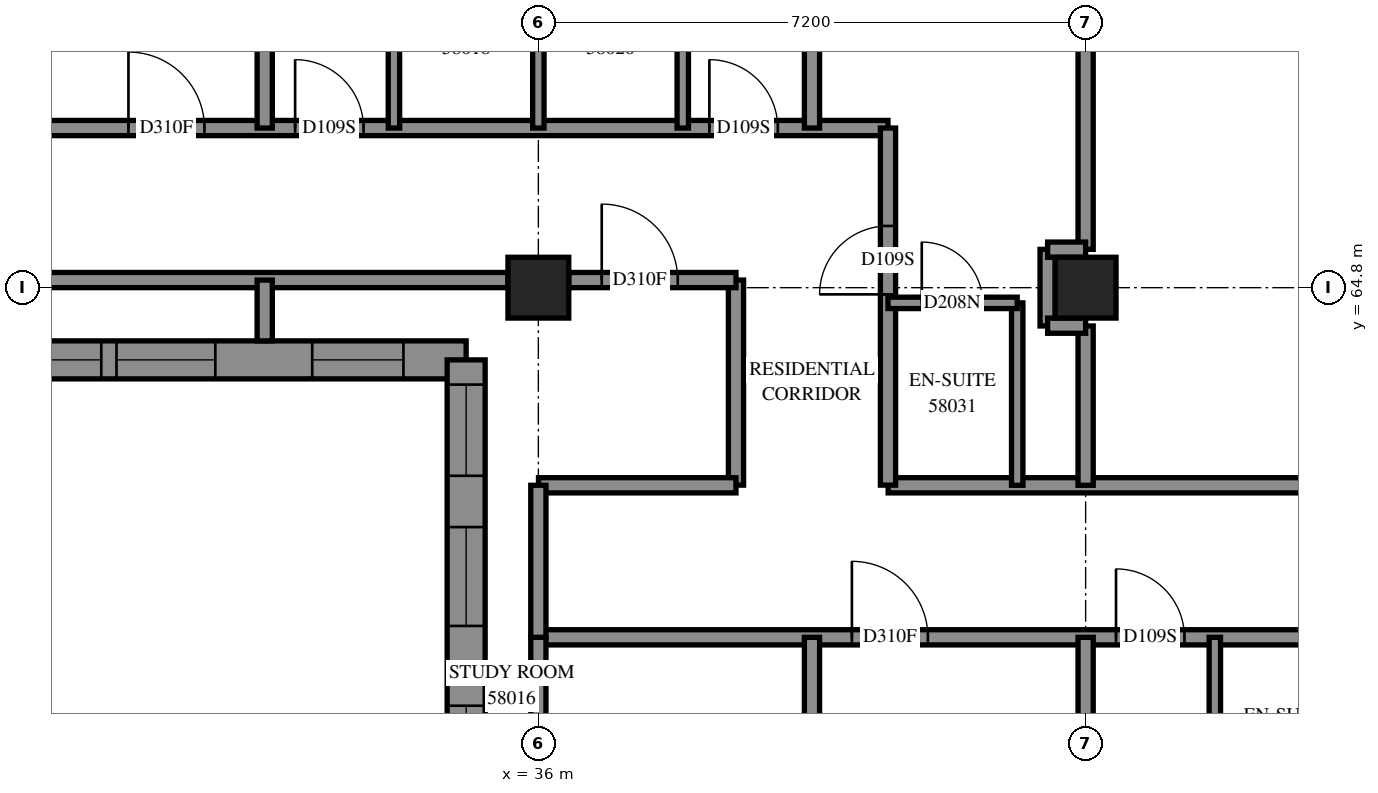
"""IFC4 building model, lengths in metres.
Left out: names, types, materials, properties, quantities, classifications, styles, units other than length and angle.
Written with IfcOpenShell. Run it as: python <this file> out.ifc"""

import sys

from ifc_helpers import new_model, si_unit, direction, frame, frame_2d, origin, origin_2d, place, context, subcontext, project, spatial, polyline, rectangle, outline, extrude, element, fill, save


model = new_model("IFC4")
c1 = context("Model", 3, precision=1e-05, world=origin(), true_north=direction((0.0, 1.0)))
c2 = subcontext(c1, "Body", "Model", "MODEL_VIEW")
j1 = project(units=[si_unit("LENGTHUNIT", "METRE"), si_unit("PLANEANGLEUNIT", "RADIAN")], contexts=[c1])
p1 = place(None, origin())
s1 = spatial("IfcSite", under=j1, at=p1, CompositionType="ELEMENT")
p2 = place(p1, origin())
s2 = spatial("IfcBuilding", under=s1, at=p2, CompositionType="ELEMENT")
p3 = place(p2, frame((0.0, 0.0, 213.4)))
s3 = spatial("IfcBuildingStorey", under=s2, at=p3, CompositionType="ELEMENT", Elevation=213.4)
for number, where, z_axis, x_axis in (
    (1, (36.0, 64.8, 0.0), (0.0, 0.0, 1.0), (1.0, 0.0, 0.0)),
    (2, (43.2, 64.8, 0.0), (0.0, 0.0, 1.0), (1.0, 0.0, 0.0)),
):
    element("IfcColumn", number, at=place(p3, frame(where, z_axis=z_axis, x_axis=x_axis)), inside=s3, PredefinedType="COLUMN", context=c2, shape_type="SweptSolid", body=[
        extrude(rectangle(XDim=0.8, YDim=0.8, at=origin_2d()), origin(), (0.0, 0.0, 1.0), 3.1),
    ])
p4 = place(p3, frame((26.738, 63.85, 0.0), z_axis=(0.0, 0.0, 1.0), x_axis=(1.0, 0.0, 0.0)))
e3 = element("IfcWall", 3, at=p4, inside=s3, PredefinedType="SOLIDWALL", context=c2, shape_type="SweptSolid", body=[
    extrude(outline(polyline([(-0.25, -0.25), (8.062, -0.25), (8.562, 0.25), (0.25, 0.25), (-0.25, -0.25)])), origin(), (0.0, 0.0, 1.0), 3.1),
])
p5 = place(p4, frame((2.212, 0.0, 0.45)))
e4 = element("IfcOpeningElement", 4, at=p5, cuts=e3, PredefinedType="OPENING", context=c2, shape_type="SweptSolid", body=[
    extrude(rectangle(XDim=1.3, YDim=2.5, at=frame_2d((0.65, 1.25))), frame((0.0, 0.26, 0.0), z_axis=(0.0, -1.0, 0.0), x_axis=(1.0, 0.0, 0.0)), (0.0, 0.0, 1.0), 0.52),
])
p6 = place(p4, frame((3.712, 0.0, 0.45)))
e5 = element("IfcOpeningElement", 5, at=p6, cuts=e3, PredefinedType="OPENING", context=c2, shape_type="SweptSolid", body=[
    extrude(rectangle(XDim=1.3, YDim=2.5, at=frame_2d((0.65, 1.25))), frame((0.0, 0.26, 0.0), z_axis=(0.0, -1.0, 0.0), x_axis=(1.0, 0.0, 0.0)), (0.0, 0.0, 1.0), 0.52),
])
p7 = place(p4, frame((0.656, 0.0, 0.45)))
e6 = element("IfcOpeningElement", 6, at=p7, cuts=e3, PredefinedType="OPENING", context=c2, shape_type="SweptSolid", body=[
    extrude(rectangle(XDim=1.2, YDim=2.5, at=frame_2d((0.6, 1.25))), frame((0.0, 0.26, 0.0), z_axis=(0.0, -1.0, 0.0), x_axis=(1.0, 0.0, 0.0)), (0.0, 0.0, 1.0), 0.52),
])
p8 = place(p4, frame((6.287, 0.0, 0.45)))
e7 = element("IfcOpeningElement", 7, at=p8, cuts=e3, PredefinedType="OPENING", context=c2, shape_type="SweptSolid", body=[
    extrude(rectangle(XDim=1.2, YDim=2.5, at=frame_2d((0.6, 1.25))), frame((0.0, 0.26, 0.0), z_axis=(0.0, -1.0, 0.0), x_axis=(1.0, 0.0, 0.0)), (0.0, 0.0, 1.0), 0.52),
])
p9 = place(p3, frame((35.05, 63.85, 0.0), z_axis=(0.0, 0.0, 1.0), x_axis=(0.0, -1.0, 0.0)))
e8 = element("IfcWall", 8, at=p9, inside=s3, PredefinedType="SOLIDWALL", context=c2, shape_type="SweptSolid", body=[
    extrude(outline(polyline([(0.25, -0.25), (7.45, -0.25), (6.95, 0.25), (-0.25, 0.25), (0.25, -0.25)])), origin(), (0.0, 0.0, 1.0), 3.1),
])
p10 = place(p9, frame((2.2, 0.0, 0.45)))
e9 = element("IfcOpeningElement", 9, at=p10, cuts=e8, PredefinedType="OPENING", context=c2, shape_type="SweptSolid", body=[
    extrude(rectangle(XDim=1.3, YDim=2.5, at=frame_2d((0.65, 1.25))), frame((0.0, 0.26, 0.0), z_axis=(0.0, -1.0, 0.0), x_axis=(1.0, 0.0, 0.0)), (0.0, 0.0, 1.0), 0.52),
])
p11 = place(p9, frame((4.55, 0.0, 0.45)))
e10 = element("IfcOpeningElement", 10, at=p11, cuts=e8, PredefinedType="OPENING", context=c2, shape_type="SweptSolid", body=[
    extrude(rectangle(XDim=1.3, YDim=2.5, at=frame_2d((0.65, 1.25))), frame((0.0, 0.26, 0.0), z_axis=(0.0, -1.0, 0.0), x_axis=(1.0, 0.0, 0.0)), (0.0, 0.0, 1.0), 0.52),
])
p12 = place(p9, frame((0.325, 0.0, 0.45)))
e11 = element("IfcOpeningElement", 11, at=p12, cuts=e8, PredefinedType="OPENING", context=c2, shape_type="SweptSolid", body=[
    extrude(rectangle(XDim=1.2, YDim=2.5, at=frame_2d((0.6, 1.25))), frame((0.0, 0.26, 0.0), z_axis=(0.0, -1.0, 0.0), x_axis=(1.0, 0.0, 0.0)), (0.0, 0.0, 1.0), 0.52),
])
p13 = place(p3, frame((36.0, 60.2, 0.0), z_axis=(0.0, 0.0, 1.0), x_axis=(1.0, 0.0, 0.0)))
e12 = element("IfcWall", 12, at=p13, inside=s3, PredefinedType="PARTITIONING", context=c2, shape_type="SweptSolid", body=[
    extrude(rectangle(XDim=17.0, YDim=0.2, at=frame_2d((8.5, 0.0))), origin(), (0.0, 0.0, 1.0), 3.1),
])
p14 = place(p13, frame((4.125, 0.0, 0.0)))
e13 = element("IfcOpeningElement", 13, at=p14, cuts=e12, PredefinedType="OPENING", context=c2, shape_type="SweptSolid", body=[
    extrude(rectangle(XDim=1.0, YDim=2.1, at=frame_2d((0.5, 1.05))), frame((0.0, 0.11, 0.0), z_axis=(0.0, -1.0, 0.0), x_axis=(1.0, 0.0, 0.0)), (0.0, 0.0, 1.0), 0.22),
])
p15 = place(p13, frame((7.6, 0.0, 0.0)))
e14 = element("IfcOpeningElement", 14, at=p15, cuts=e12, PredefinedType="OPENING", context=c2, shape_type="SweptSolid", body=[
    extrude(rectangle(XDim=0.9, YDim=2.1, at=frame_2d((0.45, 1.05))), frame((0.0, 0.11, 0.0), z_axis=(0.0, -1.0, 0.0), x_axis=(1.0, 0.0, 0.0)), (0.0, 0.0, 1.0), 0.22),
])
p16 = place(p13, frame((11.48, 0.0, 0.0)))
e15 = element("IfcOpeningElement", 15, at=p16, cuts=e12, PredefinedType="OPENING", context=c2, shape_type="SweptSolid", body=[
    extrude(rectangle(XDim=1.0, YDim=2.1, at=frame_2d((0.5, 1.05))), frame((0.0, 0.11, 0.0), z_axis=(0.0, -1.0, 0.0), x_axis=(1.0, 0.0, 0.0)), (0.0, 0.0, 1.0), 0.22),
])
p17 = place(p13, frame((15.805, 0.0, 0.0)))
e16 = element("IfcOpeningElement", 16, at=p17, cuts=e12, PredefinedType="OPENING", context=c2, shape_type="SweptSolid", body=[
    extrude(rectangle(XDim=1.0, YDim=2.1, at=frame_2d((0.5, 1.05))), frame((0.0, 0.11, 0.0), z_axis=(0.0, -1.0, 0.0), x_axis=(1.0, 0.0, 0.0)), (0.0, 0.0, 1.0), 0.22),
])
p18 = place(p3, frame((40.602, 62.2, 0.0), z_axis=(0.0, 0.0, 1.0), x_axis=(1.0, 0.0, 0.0)))
e17 = element("IfcWall", 17, at=p18, inside=s3, PredefinedType="PARTITIONING", context=c2, shape_type="SweptSolid", body=[
    extrude(rectangle(XDim=14.998, YDim=0.2, at=frame_2d((7.499, 0.0))), origin(), (0.0, 0.0, 1.0), 3.1),
])
p19 = place(p18, frame((6.308, 0.0, 0.0)))
e18 = element("IfcOpeningElement", 18, at=p19, cuts=e17, PredefinedType="OPENING", context=c2, shape_type="SweptSolid", body=[
    extrude(rectangle(XDim=1.0, YDim=2.1, at=frame_2d((0.5, 1.05))), frame((0.0, 0.11, 0.0), z_axis=(0.0, -1.0, 0.0), x_axis=(1.0, 0.0, 0.0)), (0.0, 0.0, 1.0), 0.22),
])
p20 = place(p18, frame((9.928, 0.0, 0.0)))
e19 = element("IfcOpeningElement", 19, at=p20, cuts=e17, PredefinedType="OPENING", context=c2, shape_type="SweptSolid", body=[
    extrude(rectangle(XDim=0.9, YDim=2.1, at=frame_2d((0.45, 1.05))), frame((0.0, 0.11, 0.0), z_axis=(0.0, -1.0, 0.0), x_axis=(1.0, 0.0, 0.0)), (0.0, 0.0, 1.0), 0.22),
])
p21 = place(p18, frame((13.746, 0.0, 0.0)))
e20 = element("IfcOpeningElement", 20, at=p21, cuts=e17, PredefinedType="OPENING", context=c2, shape_type="SweptSolid", body=[
    extrude(rectangle(XDim=1.0, YDim=2.1, at=frame_2d((0.5, 1.05))), frame((0.0, 0.11, 0.0), z_axis=(0.0, -1.0, 0.0), x_axis=(1.0, 0.0, 0.0)), (0.0, 0.0, 1.0), 0.22),
])
p22 = place(p3, frame((28.802, 66.9, 0.0), z_axis=(0.0, 0.0, 1.0), x_axis=(1.0, 0.0, 0.0)))
e21 = element("IfcWall", 21, at=p22, inside=s3, PredefinedType="PARTITIONING", context=c2, shape_type="SweptSolid", body=[
    extrude(rectangle(XDim=11.798, YDim=0.2, at=frame_2d((5.899, 0.0))), origin(), (0.0, 0.0, 1.0), 3.1),
])
p23 = place(p22, frame((1.805, 0.0, 0.0)))
e22 = element("IfcOpeningElement", 22, at=p23, cuts=e21, PredefinedType="OPENING", context=c2, shape_type="SweptSolid", body=[
    extrude(rectangle(XDim=1.0, YDim=2.1, at=frame_2d((0.5, 1.05))), frame((0.0, 0.11, 0.0), z_axis=(0.0, -1.0, 0.0), x_axis=(1.0, 0.0, 0.0)), (0.0, 0.0, 1.0), 0.22),
])
p24 = place(p22, frame((3.998, 0.0, 0.0)))
e23 = element("IfcOpeningElement", 23, at=p24, cuts=e21, PredefinedType="OPENING", context=c2, shape_type="SweptSolid", body=[
    extrude(rectangle(XDim=0.9, YDim=2.1, at=frame_2d((0.45, 1.05))), frame((0.0, 0.11, 0.0), z_axis=(0.0, -1.0, 0.0), x_axis=(1.0, 0.0, 0.0)), (0.0, 0.0, 1.0), 0.22),
])
p25 = place(p22, frame((9.448, 0.0, 0.0)))
e24 = element("IfcOpeningElement", 24, at=p25, cuts=e21, PredefinedType="OPENING", context=c2, shape_type="SweptSolid", body=[
    extrude(rectangle(XDim=0.9, YDim=2.1, at=frame_2d((0.45, 1.05))), frame((0.0, 0.11, 0.0), z_axis=(0.0, -1.0, 0.0), x_axis=(1.0, 0.0, 0.0)), (0.0, 0.0, 1.0), 0.22),
])
p26 = place(p3, frame((29.2, 64.9, 0.0), z_axis=(0.0, 0.0, 1.0), x_axis=(1.0, 0.0, 0.0)))
e25 = element("IfcWall", 25, at=p26, inside=s3, PredefinedType="PARTITIONING", context=c2, shape_type="SweptSolid", body=[
    extrude(rectangle(XDim=6.4, YDim=0.2, at=frame_2d((3.2, 0.0))), origin(), (0.0, 0.0, 1.0), 2.6),
])
p27 = place(p3, frame((43.2, 65.304, 0.0), z_axis=(0.0, 0.0, 1.0), x_axis=(0.0, 1.0, 0.0)))
e26 = element("IfcWall", 26, at=p27, inside=s3, PredefinedType="PARTITIONING", context=c2, shape_type="SweptSolid", body=[
    extrude(rectangle(XDim=6.192, YDim=0.2, at=frame_2d((3.096, 0.0))), origin(), (0.0, 0.0, 1.0), 3.1),
])
p28 = place(p3, frame((32.4, 66.9, 0.0), z_axis=(0.0, 0.0, 1.0), x_axis=(0.0, 1.0, 0.0)))
e27 = element("IfcWall", 27, at=p28, inside=s3, PredefinedType="PARTITIONING", context=c2, shape_type="SweptSolid", body=[
    extrude(rectangle(XDim=6.073, YDim=0.2, at=frame_2d((3.037, 0.0))), origin(), (0.0, 0.0, 1.0), 3.1),
])
p29 = place(p3, frame((39.6, 66.9, 0.0), z_axis=(0.0, 0.0, 1.0), x_axis=(0.0, 1.0, 0.0)))
e28 = element("IfcWall", 28, at=p29, inside=s3, PredefinedType="PARTITIONING", context=c2, shape_type="SweptSolid", body=[
    extrude(rectangle(XDim=6.011, YDim=0.2, at=frame_2d((3.005, 0.0))), origin(), (0.0, 0.0, 1.0), 3.1),
])
p30 = place(p3, frame((40.6, 62.202, 0.0), z_axis=(0.0, 0.0, 1.0), x_axis=(0.0, 1.0, 0.0)))
e29 = element("IfcWall", 29, at=p30, inside=s3, PredefinedType="PARTITIONING", context=c2, shape_type="SweptSolid", body=[
    extrude(rectangle(XDim=4.698, YDim=0.2, at=frame_2d((2.349, 0.0))), origin(), (0.0, 0.0, 1.0), 3.1),
])
p31 = place(p30, frame((2.51, 0.0, 0.0)))
e30 = element("IfcOpeningElement", 30, at=p31, cuts=e29, PredefinedType="OPENING", context=c2, shape_type="SweptSolid", body=[
    extrude(rectangle(XDim=0.9, YDim=2.1, at=frame_2d((0.45, 1.05))), frame((0.0, 0.11, 0.0), z_axis=(0.0, -1.0, 0.0), x_axis=(1.0, 0.0, 0.0)), (0.0, 0.0, 1.0), 0.22),
])
p32 = place(p3, frame((39.6, 56.9, 0.0), z_axis=(0.0, 0.0, 1.0), x_axis=(0.0, 1.0, 0.0)))
e31 = element("IfcWall", 31, at=p32, inside=s3, PredefinedType="PARTITIONING", context=c2, shape_type="SweptSolid", body=[
    extrude(rectangle(XDim=3.3, YDim=0.2, at=frame_2d((1.65, 0.0))), origin(), (0.0, 0.0, 1.0), 3.1),
])
p33 = place(p3, frame((38.6, 62.202, 0.0), z_axis=(0.0, 0.0, 1.0), x_axis=(0.0, 1.0, 0.0)))
e32 = element("IfcWall", 32, at=p33, inside=s3, PredefinedType="PARTITIONING", context=c2, shape_type="SweptSolid", body=[
    extrude(rectangle(XDim=2.698, YDim=0.2, at=frame_2d((1.349, 0.0))), origin(), (0.0, 0.0, 1.0), 3.1),
])
p34 = place(p3, frame((36.002, 62.2, 0.0), z_axis=(0.0, 0.0, 1.0), x_axis=(1.0, 0.0, 0.0)))
e33 = element("IfcWall", 33, at=p34, inside=s3, PredefinedType="PARTITIONING", context=c2, shape_type="SweptSolid", body=[
    extrude(rectangle(XDim=2.598, YDim=0.2, at=frame_2d((1.299, 0.0))), origin(), (0.0, 0.0, 1.0), 3.1),
])
for number, where, z_axis, x_axis in (
    (34, (44.9, 57.8, 0.0), (0.0, 0.0, 1.0), (0.0, 1.0, 0.0)),
    (35, (34.1, 66.9, 0.0), (0.0, 0.0, 1.0), (0.0, 1.0, 0.0)),
    (36, (36.0, 66.9, 0.0), (0.0, 0.0, 1.0), (0.0, 1.0, 0.0)),
    (37, (37.9, 66.9, 0.0), (0.0, 0.0, 1.0), (0.0, 1.0, 0.0)),
    (38, (42.3, 62.2, 0.0), (0.0, 0.0, 1.0), (0.0, 1.0, 0.0)),
):
    element("IfcWall", number, at=place(p3, frame(where, z_axis=z_axis, x_axis=x_axis)), inside=s3, PredefinedType="PARTITIONING", context=c2, shape_type="SweptSolid", body=[
        extrude(rectangle(XDim=2.4, YDim=0.15, at=frame_2d((1.2, 0.0))), origin(), (0.0, 0.0, 1.0), 3.1),
    ])
p35 = place(p3, frame((36.4, 64.9, 0.0), z_axis=(0.0, 0.0, 1.0), x_axis=(1.0, 0.0, 0.0)))
e39 = element("IfcWall", 39, at=p35, inside=s3, PredefinedType="PARTITIONING", context=c2, shape_type="SweptSolid", body=[
    extrude(rectangle(XDim=2.2, YDim=0.2, at=frame_2d((1.1, 0.0))), origin(), (0.0, 0.0, 1.0), 3.1),
])
p36 = place(p35, frame((0.434, 0.0, 0.0)))
e40 = element("IfcOpeningElement", 40, at=p36, cuts=e39, PredefinedType="OPENING", context=c2, shape_type="SweptSolid", body=[
    extrude(rectangle(XDim=1.0, YDim=2.1, at=frame_2d((0.5, 1.05))), frame((0.0, 0.11, 0.0), z_axis=(0.0, -1.0, 0.0), x_axis=(1.0, 0.0, 0.0)), (0.0, 0.0, 1.0), 0.22),
])
p37 = place(p3, frame((36.0, 58.0, 0.0), z_axis=(0.0, 0.0, 1.0), x_axis=(0.0, 1.0, 0.0)))
e41 = element("IfcWall", 41, at=p37, inside=s3, PredefinedType="PARTITIONING", context=c2, shape_type="SweptSolid", body=[
    extrude(rectangle(XDim=2.2, YDim=0.2, at=frame_2d((1.1, 0.0))), origin(), (0.0, 0.0, 1.0), 2.6),
])
p38 = place(p3, frame((43.2, 58.0, 0.0), z_axis=(0.0, 0.0, 1.0), x_axis=(0.0, 1.0, 0.0)))
e42 = element("IfcWall", 42, at=p38, inside=s3, PredefinedType="PARTITIONING", context=c2, shape_type="SweptSolid", body=[
    extrude(rectangle(XDim=2.2, YDim=0.2, at=frame_2d((1.1, 0.0))), origin(), (0.0, 0.0, 1.0), 3.1),
])
p39 = place(p3, frame((43.2, 62.2, 0.0), z_axis=(0.0, 0.0, 1.0), x_axis=(0.0, 1.0, 0.0)))
e43 = element("IfcWall", 43, at=p39, inside=s3, PredefinedType="PARTITIONING", context=c2, shape_type="SweptSolid", body=[
    extrude(rectangle(XDim=2.096, YDim=0.2, at=frame_2d((1.048, 0.0))), origin(), (0.0, 0.0, 1.0), 3.1),
])
p40 = place(p3, frame((36.0, 60.2, 0.0), z_axis=(0.0, 0.0, 1.0), x_axis=(0.0, 1.0, 0.0)))
e44 = element("IfcWall", 44, at=p40, inside=s3, PredefinedType="PARTITIONING", context=c2, shape_type="SweptSolid", body=[
    extrude(rectangle(XDim=2.0, YDim=0.2, at=frame_2d((1.0, 0.0))), origin(), (0.0, 0.0, 1.0), 2.6),
])
p41 = place(p3, frame((40.6, 64.6, 0.0), z_axis=(0.0, 0.0, 1.0), x_axis=(1.0, 0.0, 0.0)))
e45 = element("IfcWall", 45, at=p41, inside=s3, PredefinedType="PARTITIONING", context=c2, shape_type="SweptSolid", body=[
    extrude(rectangle(XDim=1.7, YDim=0.15, at=frame_2d((0.85, 0.0))), origin(), (0.0, 0.0, 1.0), 3.1),
])
p42 = place(p41, frame((0.444, 0.0, 0.0)))
e46 = element("IfcOpeningElement", 46, at=p42, cuts=e45, PredefinedType="OPENING", context=c2, shape_type="SweptSolid", body=[
    extrude(rectangle(XDim=0.8, YDim=2.1, at=frame_2d((0.4, 1.05))), frame((0.0, 0.085, 0.0), z_axis=(0.0, -1.0, 0.0), x_axis=(1.0, 0.0, 0.0)), (0.0, 0.0, 1.0), 0.17),
])
p43 = place(p3, frame((42.7, 64.296, 0.0), z_axis=(0.0, 0.0, 1.0), x_axis=(0.0, 1.0, 0.0)))
e47 = element("IfcWall", 47, at=p43, inside=s3, PredefinedType="PARTITIONING", context=c2, shape_type="SweptSolid", body=[
    extrude(rectangle(XDim=1.008, YDim=0.2, at=frame_2d((0.504, 0.0))), origin(), (0.0, 0.0, 1.0), 3.1),
])
p44 = place(p3, frame((32.4, 64.1, 0.0), z_axis=(0.0, 0.0, 1.0), x_axis=(0.0, 1.0, 0.0)))
e48 = element("IfcWall", 48, at=p44, inside=s3, PredefinedType="PARTITIONING", context=c2, shape_type="SweptSolid", body=[
    extrude(rectangle(XDim=0.8, YDim=0.2, at=frame_2d((0.4, 0.0))), origin(), (0.0, 0.0, 1.0), 3.1),
])
for number, where, z_axis, x_axis in (
    (49, (42.7, 65.3, 0.0), (0.0, 0.0, 1.0), (1.0, 0.0, 0.0)),
    (50, (42.7, 64.3, 0.0), (0.0, 0.0, 1.0), (1.0, 0.0, 0.0)),
):
    element("IfcWall", number, at=place(p3, frame(where, z_axis=z_axis, x_axis=x_axis)), inside=s3, PredefinedType="PARTITIONING", context=c2, shape_type="SweptSolid", body=[
        extrude(rectangle(XDim=0.5, YDim=0.2, at=frame_2d((0.25, 0.0))), origin(), (0.0, 0.0, 1.0), 3.1),
    ])
p45 = place(p5, origin())
e51 = element("IfcWindow", 51, at=p45, inside=s3, PartitioningType="SINGLE_PANEL", PredefinedType="WINDOW", context=c2, shape_type="SweptSolid", body=[
    extrude(rectangle(XDim=1.3, YDim=2.5, at=frame_2d((0.65, 1.25))), frame((0.0, 0.18, 0.0), z_axis=(0.0, -1.0, 0.0), x_axis=(1.0, 0.0, 0.0)), (0.0, 0.0, 1.0), 0.06),
])
fill(e4, e51)
p46 = place(p6, origin())
e52 = element("IfcWindow", 52, at=p46, inside=s3, PartitioningType="SINGLE_PANEL", PredefinedType="WINDOW", context=c2, shape_type="SweptSolid", body=[
    extrude(rectangle(XDim=1.3, YDim=2.5, at=frame_2d((0.65, 1.25))), frame((0.0, 0.18, 0.0), z_axis=(0.0, -1.0, 0.0), x_axis=(1.0, 0.0, 0.0)), (0.0, 0.0, 1.0), 0.06),
])
fill(e5, e52)
p47 = place(p8, origin())
e53 = element("IfcWindow", 53, at=p47, inside=s3, PartitioningType="SINGLE_PANEL", PredefinedType="WINDOW", context=c2, shape_type="SweptSolid", body=[
    extrude(rectangle(XDim=1.2, YDim=2.5, at=frame_2d((0.6, 1.25))), frame((0.0, 0.18, 0.0), z_axis=(0.0, -1.0, 0.0), x_axis=(1.0, 0.0, 0.0)), (0.0, 0.0, 1.0), 0.06),
])
fill(e7, e53)
p48 = place(p10, origin())
e54 = element("IfcWindow", 54, at=p48, inside=s3, PartitioningType="SINGLE_PANEL", PredefinedType="WINDOW", context=c2, shape_type="SweptSolid", body=[
    extrude(rectangle(XDim=1.3, YDim=2.5, at=frame_2d((0.65, 1.25))), frame((0.0, 0.18, 0.0), z_axis=(0.0, -1.0, 0.0), x_axis=(1.0, 0.0, 0.0)), (0.0, 0.0, 1.0), 0.06),
])
fill(e9, e54)
p49 = place(p11, origin())
e55 = element("IfcWindow", 55, at=p49, inside=s3, PartitioningType="SINGLE_PANEL", PredefinedType="WINDOW", context=c2, shape_type="SweptSolid", body=[
    extrude(rectangle(XDim=1.3, YDim=2.5, at=frame_2d((0.65, 1.25))), frame((0.0, 0.18, 0.0), z_axis=(0.0, -1.0, 0.0), x_axis=(1.0, 0.0, 0.0)), (0.0, 0.0, 1.0), 0.06),
])
fill(e10, e55)
p50 = place(p12, origin())
e56 = element("IfcWindow", 56, at=p50, inside=s3, PartitioningType="SINGLE_PANEL", PredefinedType="WINDOW", context=c2, shape_type="SweptSolid", body=[
    extrude(rectangle(XDim=1.2, YDim=2.5, at=frame_2d((0.6, 1.25))), frame((0.0, 0.18, 0.0), z_axis=(0.0, -1.0, 0.0), x_axis=(1.0, 0.0, 0.0)), (0.0, 0.0, 1.0), 0.06),
])
fill(e11, e56)
p51 = place(p23, origin())
e57 = element("IfcDoor", 57, at=p51, inside=s3, OperationType="SINGLE_SWING_RIGHT", PredefinedType="DOOR", context=c2, shape_type="SweptSolid", body=[
    extrude(rectangle(XDim=1.0, YDim=2.1, at=frame_2d((0.5, 1.05))), frame((0.0, 0.025, 0.0), z_axis=(0.0, -1.0, 0.0), x_axis=(1.0, 0.0, 0.0)), (0.0, 0.0, 1.0), 0.05),
])
fill(e22, e57)
p52 = place(p36, origin())
e58 = element("IfcDoor", 58, at=p52, inside=s3, OperationType="SINGLE_SWING_RIGHT", PredefinedType="DOOR", context=c2, shape_type="SweptSolid", body=[
    extrude(rectangle(XDim=1.0, YDim=2.1, at=frame_2d((0.5, 1.05))), frame((0.0, 0.025, 0.0), z_axis=(0.0, -1.0, 0.0), x_axis=(1.0, 0.0, 0.0)), (0.0, 0.0, 1.0), 0.05),
])
fill(e40, e58)
p53 = place(p24, origin())
e59 = element("IfcDoor", 59, at=p53, inside=s3, OperationType="SINGLE_SWING_LEFT", PredefinedType="DOOR", context=c2, shape_type="SweptSolid", body=[
    extrude(rectangle(XDim=0.9, YDim=2.1, at=frame_2d((0.45, 1.05))), frame((0.0, 0.025, 0.0), z_axis=(0.0, -1.0, 0.0), x_axis=(1.0, 0.0, 0.0)), (0.0, 0.0, 1.0), 0.05),
])
fill(e23, e59)
p54 = place(p25, origin())
e60 = element("IfcDoor", 60, at=p54, inside=s3, OperationType="SINGLE_SWING_RIGHT", PredefinedType="DOOR", context=c2, shape_type="SweptSolid", body=[
    extrude(rectangle(XDim=0.9, YDim=2.1, at=frame_2d((0.45, 1.05))), frame((0.0, 0.025, 0.0), z_axis=(0.0, -1.0, 0.0), x_axis=(1.0, 0.0, 0.0)), (0.0, 0.0, 1.0), 0.05),
])
fill(e24, e60)
p55 = place(p14, origin())
e61 = element("IfcDoor", 61, at=p55, inside=s3, OperationType="SINGLE_SWING_RIGHT", PredefinedType="DOOR", context=c2, shape_type="SweptSolid", body=[
    extrude(rectangle(XDim=1.0, YDim=2.1, at=frame_2d((0.5, 1.05))), frame((0.0, 0.025, 0.0), z_axis=(0.0, -1.0, 0.0), x_axis=(1.0, 0.0, 0.0)), (0.0, 0.0, 1.0), 0.05),
])
fill(e13, e61)
p56 = place(p15, origin())
e62 = element("IfcDoor", 62, at=p56, inside=s3, OperationType="SINGLE_SWING_LEFT", PredefinedType="DOOR", context=c2, shape_type="SweptSolid", body=[
    extrude(rectangle(XDim=0.9, YDim=2.1, at=frame_2d((0.45, 1.05))), frame((0.0, 0.025, 0.0), z_axis=(0.0, -1.0, 0.0), x_axis=(1.0, 0.0, 0.0)), (0.0, 0.0, 1.0), 0.05),
])
fill(e14, e62)
p57 = place(p31, origin())
e63 = element("IfcDoor", 63, at=p57, inside=s3, OperationType="SINGLE_SWING_LEFT", PredefinedType="DOOR", context=c2, shape_type="SweptSolid", body=[
    extrude(rectangle(XDim=0.9, YDim=2.1, at=frame_2d((0.45, 1.05))), frame((0.0, 0.025, 0.0), z_axis=(0.0, -1.0, 0.0), x_axis=(1.0, 0.0, 0.0)), (0.0, 0.0, 1.0), 0.05),
])
fill(e30, e63)
p58 = place(p42, origin())
e64 = element("IfcDoor", 64, at=p58, inside=s3, OperationType="SINGLE_SWING_RIGHT", PredefinedType="DOOR", context=c2, shape_type="SweptSolid", body=[
    extrude(rectangle(XDim=0.8, YDim=2.1, at=frame_2d((0.4, 1.05))), frame((0.0, 0.025, 0.0), z_axis=(0.0, -1.0, 0.0), x_axis=(1.0, 0.0, 0.0)), (0.0, 0.0, 1.0), 0.05),
])
fill(e46, e64)
save(model, sys.argv[1])
